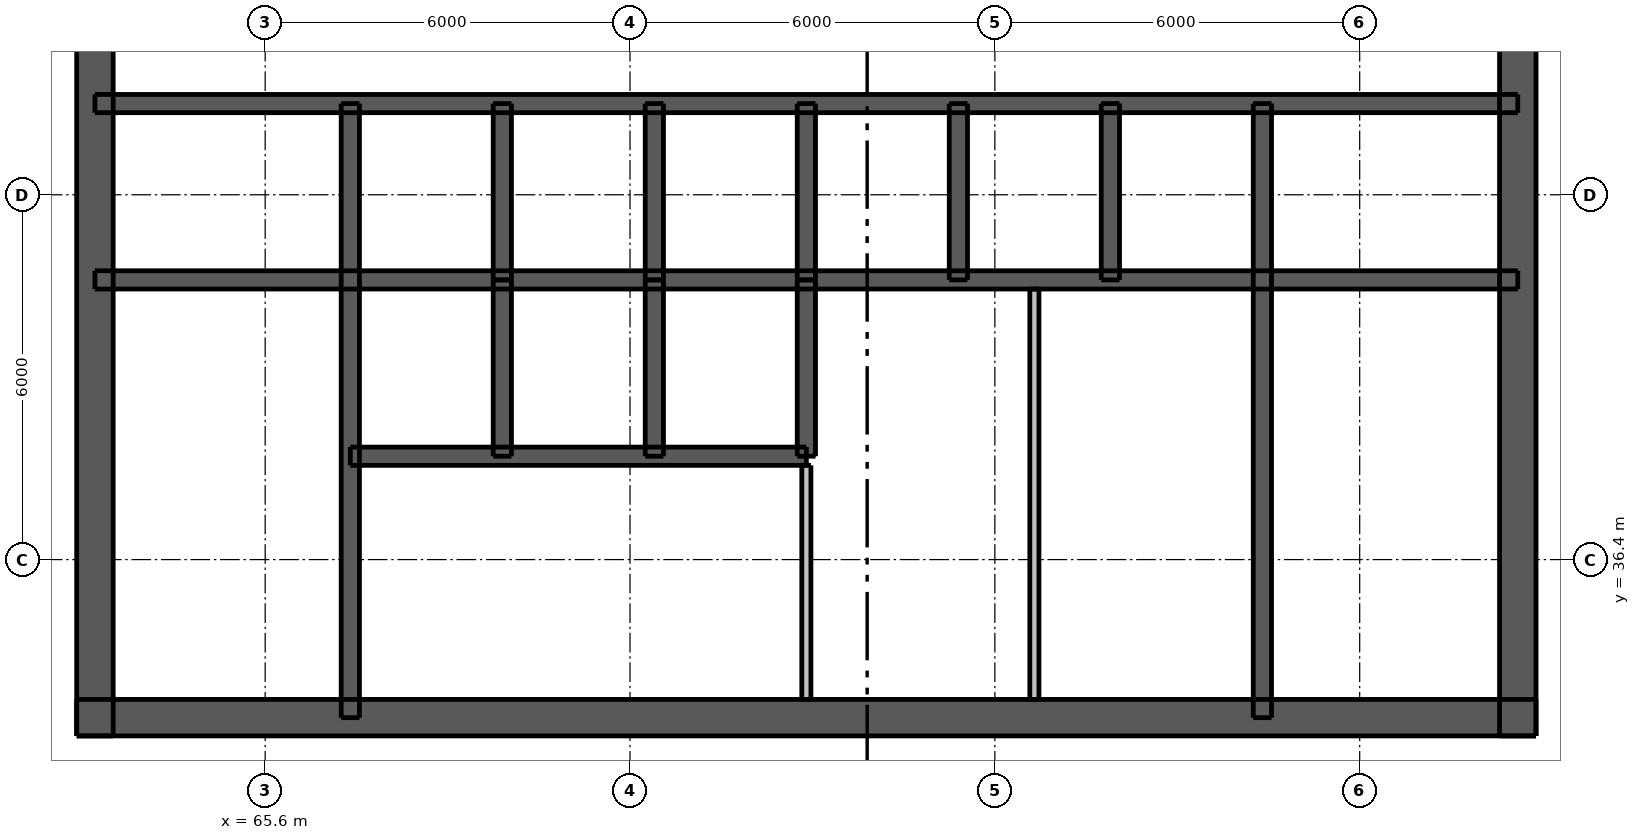
"""IFC4 building model, lengths in metres.
Left out: names, types, materials, properties, quantities, classifications, styles, units other than length and angle.
Written with IfcOpenShell. Run it as: python <this file> out.ifc"""

import sys

from ifc_helpers import new_model, si_unit, direction, frame, frame_2d, origin, place, context, subcontext, project, spatial, rectangle, extrude, element, fill, save


model = new_model("IFC4")
c1 = context("Model", 3, precision=1e-05, world=origin(), true_north=direction((0.0, 1.0)))
c2 = subcontext(c1, "Body", "Model", "MODEL_VIEW")
j1 = project(units=[si_unit("LENGTHUNIT", "METRE"), si_unit("PLANEANGLEUNIT", "RADIAN")], contexts=[c1])
p1 = place(None, origin())
s1 = spatial("IfcSite", under=j1, at=p1, CompositionType="ELEMENT")
p2 = place(p1, origin())
s2 = spatial("IfcBuilding", under=s1, at=p2, CompositionType="ELEMENT")
p3 = place(p2, frame((0.0, 0.0, 226.6)))
s3 = spatial("IfcBuildingStorey", under=s2, at=p3, CompositionType="ELEMENT", Elevation=226.6)
p4 = place(p3, frame((62.5, 33.8, 0.0), z_axis=(0.0, 0.0, 1.0), x_axis=(1.0, 0.0, 0.0)))
e1 = element("IfcWall", 1, at=p4, inside=s3, PredefinedType="SHEAR", context=c2, shape_type="SweptSolid", body=[
    extrude(rectangle(XDim=24.0, YDim=0.6, at=frame_2d((12.0, 0.0))), origin(), (0.0, 0.0, 1.0), 2.95),
])
p5 = place(p4, frame((1.925, 0.0, 0.0)))
e2 = element("IfcOpeningElement", 2, at=p5, cuts=e1, PredefinedType="OPENING", context=c2, shape_type="SweptSolid", body=[
    extrude(rectangle(XDim=1.1, YDim=2.1, at=frame_2d((0.55, 1.05))), frame((0.0, 0.31, 0.0), z_axis=(0.0, -1.0, 0.0), x_axis=(1.0, 0.0, 0.0)), (0.0, 0.0, 1.0), 0.62),
])
p6 = place(p4, frame((20.975, 0.0, 0.0)))
e3 = element("IfcOpeningElement", 3, at=p6, cuts=e1, PredefinedType="OPENING", context=c2, shape_type="SweptSolid", body=[
    extrude(rectangle(XDim=1.1, YDim=2.1, at=frame_2d((0.55, 1.05))), frame((0.0, 0.31, 0.0), z_axis=(0.0, -1.0, 0.0), x_axis=(1.0, 0.0, 0.0)), (0.0, 0.0, 1.0), 0.62),
])
p7 = place(p4, frame((8.0, 0.0, 0.0)))
e4 = element("IfcOpeningElement", 4, at=p7, cuts=e1, PredefinedType="OPENING", context=c2, shape_type="SweptSolid", body=[
    extrude(rectangle(XDim=1.1, YDim=2.1, at=frame_2d((0.55, 1.05))), frame((0.0, 0.31, 0.0), z_axis=(0.0, -1.0, 0.0), x_axis=(1.0, 0.0, 0.0)), (0.0, 0.0, 1.0), 0.62),
])
p8 = place(p4, frame((13.5, 0.0, 0.0)))
e5 = element("IfcOpeningElement", 5, at=p8, cuts=e1, PredefinedType="OPENING", context=c2, shape_type="SweptSolid", body=[
    extrude(rectangle(XDim=0.9, YDim=2.1, at=frame_2d((0.45, 1.05))), frame((0.0, 0.31, 0.0), z_axis=(0.0, -1.0, 0.0), x_axis=(1.0, 0.0, 0.0)), (0.0, 0.0, 1.0), 0.62),
])
p9 = place(p4, frame((17.1, 0.0, 0.0)))
e6 = element("IfcOpeningElement", 6, at=p9, cuts=e1, PredefinedType="OPENING", context=c2, shape_type="SweptSolid", body=[
    extrude(rectangle(XDim=0.9, YDim=2.1, at=frame_2d((0.45, 1.05))), frame((0.0, 0.31, 0.0), z_axis=(0.0, -1.0, 0.0), x_axis=(1.0, 0.0, 0.0)), (0.0, 0.0, 1.0), 0.62),
])
p10 = place(p3, frame((62.8, 33.5, 0.0), z_axis=(0.0, 0.0, 1.0), x_axis=(0.0, 1.0, 0.0)))
e7 = element("IfcWall", 7, at=p10, inside=s3, PredefinedType="SHEAR", context=c2, shape_type="SweptSolid", body=[
    extrude(rectangle(XDim=24.0, YDim=0.6, at=frame_2d((12.0, 0.0))), origin(), (0.0, 0.0, 1.0), 2.95),
])
p11 = place(p10, frame((11.2, 0.0, 0.0)))
e8 = element("IfcOpeningElement", 8, at=p11, cuts=e7, PredefinedType="OPENING", context=c2, shape_type="SweptSolid", body=[
    extrude(rectangle(XDim=1.6, YDim=2.1, at=frame_2d((0.8, 1.05))), frame((0.0, 0.31, 0.0), z_axis=(0.0, -1.0, 0.0), x_axis=(1.0, 0.0, 0.0)), (0.0, 0.0, 1.0), 0.62),
])
p12 = place(p3, frame((86.2, 33.5, 0.0), z_axis=(0.0, 0.0, 1.0), x_axis=(0.0, 1.0, 0.0)))
e9 = element("IfcWall", 9, at=p12, inside=s3, PredefinedType="SHEAR", context=c2, shape_type="SweptSolid", body=[
    extrude(rectangle(XDim=24.0, YDim=0.6, at=frame_2d((12.0, 0.0))), origin(), (0.0, 0.0, 1.0), 2.95),
])
p13 = place(p12, frame((11.2, 0.0, 0.0)))
e10 = element("IfcOpeningElement", 10, at=p13, cuts=e9, PredefinedType="OPENING", context=c2, shape_type="SweptSolid", body=[
    extrude(rectangle(XDim=1.6, YDim=2.1, at=frame_2d((0.8, 1.05))), frame((0.0, 0.31, 0.0), z_axis=(0.0, -1.0, 0.0), x_axis=(1.0, 0.0, 0.0)), (0.0, 0.0, 1.0), 0.62),
])
p14 = place(p3, frame((62.8, 41.0, 0.0), z_axis=(0.0, 0.0, 1.0), x_axis=(1.0, 0.0, 0.0)))
e11 = element("IfcWall", 11, at=p14, inside=s3, PredefinedType="SHEAR", context=c2, shape_type="SweptSolid", body=[
    extrude(rectangle(XDim=23.4, YDim=0.3, at=frame_2d((11.7, 0.0))), origin(), (0.0, 0.0, 1.0), 2.95),
])
p15 = place(p3, frame((62.8, 43.9, 0.0), z_axis=(0.0, 0.0, 1.0), x_axis=(1.0, 0.0, 0.0)))
e12 = element("IfcWall", 12, at=p15, inside=s3, PredefinedType="SHEAR", context=c2, shape_type="SweptSolid", body=[
    extrude(rectangle(XDim=23.4, YDim=0.3, at=frame_2d((11.7, 0.0))), origin(), (0.0, 0.0, 1.0), 2.95),
])
p16 = place(p15, frame((1.725, 0.0, 0.0)))
e13 = element("IfcOpeningElement", 13, at=p16, cuts=e12, PredefinedType="OPENING", context=c2, shape_type="SweptSolid", body=[
    extrude(rectangle(XDim=0.9, YDim=2.1, at=frame_2d((0.45, 1.05))), frame((0.0, 0.16, 0.0), z_axis=(0.0, -1.0, 0.0), x_axis=(1.0, 0.0, 0.0)), (0.0, 0.0, 1.0), 0.32),
])
p17 = place(p15, frame((20.775, 0.0, 0.0)))
e14 = element("IfcOpeningElement", 14, at=p17, cuts=e12, PredefinedType="OPENING", context=c2, shape_type="SweptSolid", body=[
    extrude(rectangle(XDim=0.9, YDim=2.1, at=frame_2d((0.45, 1.05))), frame((0.0, 0.16, 0.0), z_axis=(0.0, -1.0, 0.0), x_axis=(1.0, 0.0, 0.0)), (0.0, 0.0, 1.0), 0.32),
])
p18 = place(p15, frame((5.0, 0.0, 0.0)))
e15 = element("IfcOpeningElement", 15, at=p18, cuts=e12, PredefinedType="OPENING", context=c2, shape_type="SweptSolid", body=[
    extrude(rectangle(XDim=0.9, YDim=2.1, at=frame_2d((0.45, 1.05))), frame((0.0, 0.16, 0.0), z_axis=(0.0, -1.0, 0.0), x_axis=(1.0, 0.0, 0.0)), (0.0, 0.0, 1.0), 0.32),
])
p19 = place(p15, frame((7.5, 0.0, 0.0)))
e16 = element("IfcOpeningElement", 16, at=p19, cuts=e12, PredefinedType="OPENING", context=c2, shape_type="SweptSolid", body=[
    extrude(rectangle(XDim=0.9, YDim=2.1, at=frame_2d((0.45, 1.05))), frame((0.0, 0.16, 0.0), z_axis=(0.0, -1.0, 0.0), x_axis=(1.0, 0.0, 0.0)), (0.0, 0.0, 1.0), 0.32),
])
p20 = place(p15, frame((12.5, 0.0, 0.0)))
e17 = element("IfcOpeningElement", 17, at=p20, cuts=e12, PredefinedType="OPENING", context=c2, shape_type="SweptSolid", body=[
    extrude(rectangle(XDim=0.9, YDim=2.1, at=frame_2d((0.45, 1.05))), frame((0.0, 0.16, 0.0), z_axis=(0.0, -1.0, 0.0), x_axis=(1.0, 0.0, 0.0)), (0.0, 0.0, 1.0), 0.32),
])
p21 = place(p15, frame((15.0, 0.0, 0.0)))
e18 = element("IfcOpeningElement", 18, at=p21, cuts=e12, PredefinedType="OPENING", context=c2, shape_type="SweptSolid", body=[
    extrude(rectangle(XDim=0.9, YDim=2.1, at=frame_2d((0.45, 1.05))), frame((0.0, 0.16, 0.0), z_axis=(0.0, -1.0, 0.0), x_axis=(1.0, 0.0, 0.0)), (0.0, 0.0, 1.0), 0.32),
])
p22 = place(p3, frame((67.0, 33.8, 0.0), z_axis=(0.0, 0.0, 1.0), x_axis=(0.0, 1.0, 0.0)))
e19 = element("IfcWall", 19, at=p22, inside=s3, PredefinedType="SHEAR", context=c2, shape_type="SweptSolid", body=[
    extrude(rectangle(XDim=10.1, YDim=0.3, at=frame_2d((5.05, 0.0))), origin(), (0.0, 0.0, 1.0), 2.95),
])
p23 = place(p22, frame((0.5, 0.0, 0.0)))
e20 = element("IfcOpeningElement", 20, at=p23, cuts=e19, PredefinedType="OPENING", context=c2, shape_type="SweptSolid", body=[
    extrude(rectangle(XDim=1.1, YDim=2.1, at=frame_2d((0.55, 1.05))), frame((0.0, 0.16, 0.0), z_axis=(0.0, -1.0, 0.0), x_axis=(1.0, 0.0, 0.0)), (0.0, 0.0, 1.0), 0.32),
])
p24 = place(p3, frame((82.0, 33.8, 0.0), z_axis=(0.0, 0.0, 1.0), x_axis=(0.0, 1.0, 0.0)))
e21 = element("IfcWall", 21, at=p24, inside=s3, PredefinedType="SHEAR", context=c2, shape_type="SweptSolid", body=[
    extrude(rectangle(XDim=10.1, YDim=0.3, at=frame_2d((5.05, 0.0))), origin(), (0.0, 0.0, 1.0), 2.95),
])
for number, where, z_axis, x_axis in (
    (22, (69.5, 41.0, 0.0), (0.0, 0.0, 1.0), (0.0, 1.0, 0.0)),
    (23, (72.0, 41.0, 0.0), (0.0, 0.0, 1.0), (0.0, 1.0, 0.0)),
    (24, (74.5, 41.0, 0.0), (0.0, 0.0, 1.0), (0.0, 1.0, 0.0)),
    (25, (77.0, 41.0, 0.0), (0.0, 0.0, 1.0), (0.0, 1.0, 0.0)),
    (26, (79.5, 41.0, 0.0), (0.0, 0.0, 1.0), (0.0, 1.0, 0.0)),
):
    element("IfcWall", number, at=place(p3, frame(where, z_axis=z_axis, x_axis=x_axis)), inside=s3, PredefinedType="SHEAR", context=c2, shape_type="SweptSolid", body=[
        extrude(rectangle(XDim=2.9, YDim=0.3, at=frame_2d((1.45, 0.0))), origin(), (0.0, 0.0, 1.0), 2.95),
    ])
p25 = place(p3, frame((67.0, 38.1, 0.0), z_axis=(0.0, 0.0, 1.0), x_axis=(1.0, 0.0, 0.0)))
e27 = element("IfcWall", 27, at=p25, inside=s3, PredefinedType="SHEAR", context=c2, shape_type="SweptSolid", body=[
    extrude(rectangle(XDim=7.5, YDim=0.3, at=frame_2d((3.75, 0.0))), origin(), (0.0, 0.0, 1.0), 2.95),
])
p26 = place(p25, frame((0.7, 0.0, 0.0)))
e28 = element("IfcOpeningElement", 28, at=p26, cuts=e27, PredefinedType="OPENING", context=c2, shape_type="SweptSolid", body=[
    extrude(rectangle(XDim=1.1, YDim=2.1, at=frame_2d((0.55, 1.05))), frame((0.0, 0.16, 0.0), z_axis=(0.0, -1.0, 0.0), x_axis=(1.0, 0.0, 0.0)), (0.0, 0.0, 1.0), 0.32),
])
p27 = place(p25, frame((3.2, 0.0, 0.0)))
e29 = element("IfcOpeningElement", 29, at=p27, cuts=e27, PredefinedType="OPENING", context=c2, shape_type="SweptSolid", body=[
    extrude(rectangle(XDim=1.1, YDim=2.1, at=frame_2d((0.55, 1.05))), frame((0.0, 0.16, 0.0), z_axis=(0.0, -1.0, 0.0), x_axis=(1.0, 0.0, 0.0)), (0.0, 0.0, 1.0), 0.32),
])
p28 = place(p25, frame((5.65, 0.0, 0.0)))
e30 = element("IfcOpeningElement", 30, at=p28, cuts=e27, PredefinedType="OPENING", context=c2, shape_type="SweptSolid", body=[
    extrude(rectangle(XDim=1.2, YDim=2.1, at=frame_2d((0.6, 1.05))), frame((0.0, 0.16, 0.0), z_axis=(0.0, -1.0, 0.0), x_axis=(1.0, 0.0, 0.0)), (0.0, 0.0, 1.0), 0.32),
])
for number, where, z_axis, x_axis in (
    (31, (69.5, 38.1, 0.0), (0.0, 0.0, 1.0), (0.0, 1.0, 0.0)),
    (32, (72.0, 38.1, 0.0), (0.0, 0.0, 1.0), (0.0, 1.0, 0.0)),
    (33, (74.5, 38.1, 0.0), (0.0, 0.0, 1.0), (0.0, 1.0, 0.0)),
):
    element("IfcWall", number, at=place(p3, frame(where, z_axis=z_axis, x_axis=x_axis)), inside=s3, PredefinedType="SHEAR", context=c2, shape_type="SweptSolid", body=[
        extrude(rectangle(XDim=2.9, YDim=0.3, at=frame_2d((1.45, 0.0))), origin(), (0.0, 0.0, 1.0), 2.95),
    ])
p29 = place(p3, frame((74.5, 34.1, 0.0), z_axis=(0.0, 0.0, 1.0), x_axis=(0.0, 1.0, 0.0)))
e34 = element("IfcWall", 34, at=p29, inside=s3, PredefinedType="PLUMBINGWALL", context=c2, shape_type="SweptSolid", body=[
    extrude(rectangle(XDim=3.85, YDim=0.15, at=frame_2d((1.925, 0.0))), origin(), (0.0, 0.0, 1.0), 2.95),
])
p30 = place(p3, frame((78.25, 34.1, 0.0), z_axis=(0.0, 0.0, 1.0), x_axis=(0.0, 1.0, 0.0)))
e35 = element("IfcWall", 35, at=p30, inside=s3, PredefinedType="PLUMBINGWALL", context=c2, shape_type="SweptSolid", body=[
    extrude(rectangle(XDim=6.75, YDim=0.15, at=frame_2d((3.375, 0.0))), origin(), (0.0, 0.0, 1.0), 2.95),
])
p31 = place(p5, origin())
e36 = element("IfcDoor", 36, at=p31, inside=s3, OperationType="SINGLE_SWING_LEFT", PredefinedType="DOOR", context=c2, shape_type="SweptSolid", body=[
    extrude(rectangle(XDim=1.1, YDim=2.1, at=frame_2d((0.55, 1.05))), frame((0.0, 0.288, 0.0), z_axis=(0.0, -1.0, 0.0), x_axis=(1.0, 0.0, 0.0)), (0.0, 0.0, 1.0), 0.05),
])
fill(e2, e36)
p32 = place(p6, origin())
e37 = element("IfcDoor", 37, at=p32, inside=s3, OperationType="SINGLE_SWING_RIGHT", PredefinedType="DOOR", context=c2, shape_type="SweptSolid", body=[
    extrude(rectangle(XDim=1.1, YDim=2.1, at=frame_2d((0.55, 1.05))), frame((0.0, 0.288, 0.0), z_axis=(0.0, -1.0, 0.0), x_axis=(1.0, 0.0, 0.0)), (0.0, 0.0, 1.0), 0.05),
])
fill(e3, e37)
p33 = place(p11, origin())
e38 = element("IfcDoor", 38, at=p33, inside=s3, OperationType="DOUBLE_DOOR_SINGLE_SWING", PredefinedType="DOOR", context=c2, shape_type="SweptSolid", body=[
    extrude(rectangle(XDim=1.6, YDim=2.1, at=frame_2d((0.8, 1.05))), frame((0.0, -0.237, 0.0), z_axis=(0.0, -1.0, 0.0), x_axis=(1.0, 0.0, 0.0)), (0.0, 0.0, 1.0), 0.05),
])
fill(e8, e38)
p34 = place(p13, origin())
e39 = element("IfcDoor", 39, at=p34, inside=s3, OperationType="DOUBLE_DOOR_SINGLE_SWING", PredefinedType="DOOR", context=c2, shape_type="SweptSolid", body=[
    extrude(rectangle(XDim=1.6, YDim=2.1, at=frame_2d((0.8, 1.05))), frame((0.0, 0.288, 0.0), z_axis=(0.0, -1.0, 0.0), x_axis=(1.0, 0.0, 0.0)), (0.0, 0.0, 1.0), 0.05),
])
fill(e10, e39)
p35 = place(p7, origin())
e40 = element("IfcDoor", 40, at=p35, inside=s3, OperationType="SINGLE_SWING_LEFT", PredefinedType="DOOR", context=c2, shape_type="SweptSolid", body=[
    extrude(rectangle(XDim=1.1, YDim=2.1, at=frame_2d((0.55, 1.05))), frame((0.0, 0.288, 0.0), z_axis=(0.0, -1.0, 0.0), x_axis=(1.0, 0.0, 0.0)), (0.0, 0.0, 1.0), 0.05),
])
fill(e4, e40)
p36 = place(p23, origin())
e41 = element("IfcDoor", 41, at=p36, inside=s3, OperationType="SINGLE_SWING_RIGHT", PredefinedType="DOOR", context=c2, shape_type="SweptSolid", body=[
    extrude(rectangle(XDim=1.1, YDim=2.1, at=frame_2d((0.55, 1.05))), frame((0.0, -0.087, 0.0), z_axis=(0.0, -1.0, 0.0), x_axis=(1.0, 0.0, 0.0)), (0.0, 0.0, 1.0), 0.05),
])
fill(e20, e41)
p37 = place(p8, origin())
e42 = element("IfcDoor", 42, at=p37, inside=s3, OperationType="SINGLE_SWING_LEFT", PredefinedType="DOOR", context=c2, shape_type="SweptSolid", body=[
    extrude(rectangle(XDim=0.9, YDim=2.1, at=frame_2d((0.45, 1.05))), frame((0.0, 0.288, 0.0), z_axis=(0.0, -1.0, 0.0), x_axis=(1.0, 0.0, 0.0)), (0.0, 0.0, 1.0), 0.05),
])
fill(e5, e42)
p38 = place(p9, origin())
e43 = element("IfcDoor", 43, at=p38, inside=s3, OperationType="SINGLE_SWING_LEFT", PredefinedType="DOOR", context=c2, shape_type="SweptSolid", body=[
    extrude(rectangle(XDim=0.9, YDim=2.1, at=frame_2d((0.45, 1.05))), frame((0.0, 0.288, 0.0), z_axis=(0.0, -1.0, 0.0), x_axis=(1.0, 0.0, 0.0)), (0.0, 0.0, 1.0), 0.05),
])
fill(e6, e43)
p39 = place(p16, origin())
e44 = element("IfcDoor", 44, at=p39, inside=s3, OperationType="SINGLE_SWING_LEFT", PredefinedType="DOOR", context=c2, shape_type="SweptSolid", body=[
    extrude(rectangle(XDim=0.9, YDim=2.1, at=frame_2d((0.45, 1.05))), frame((0.0, -0.087, 0.0), z_axis=(0.0, -1.0, 0.0), x_axis=(1.0, 0.0, 0.0)), (0.0, 0.0, 1.0), 0.05),
])
fill(e13, e44)
p40 = place(p17, origin())
e45 = element("IfcDoor", 45, at=p40, inside=s3, OperationType="SINGLE_SWING_LEFT", PredefinedType="DOOR", context=c2, shape_type="SweptSolid", body=[
    extrude(rectangle(XDim=0.9, YDim=2.1, at=frame_2d((0.45, 1.05))), frame((0.0, -0.087, 0.0), z_axis=(0.0, -1.0, 0.0), x_axis=(1.0, 0.0, 0.0)), (0.0, 0.0, 1.0), 0.05),
])
fill(e14, e45)
p41 = place(p18, origin())
e46 = element("IfcDoor", 46, at=p41, inside=s3, OperationType="SINGLE_SWING_RIGHT", PredefinedType="DOOR", context=c2, shape_type="SweptSolid", body=[
    extrude(rectangle(XDim=0.9, YDim=2.1, at=frame_2d((0.45, 1.05))), frame((0.0, -0.087, 0.0), z_axis=(0.0, -1.0, 0.0), x_axis=(1.0, 0.0, 0.0)), (0.0, 0.0, 1.0), 0.05),
])
fill(e15, e46)
p42 = place(p19, origin())
e47 = element("IfcDoor", 47, at=p42, inside=s3, OperationType="SINGLE_SWING_LEFT", PredefinedType="DOOR", context=c2, shape_type="SweptSolid", body=[
    extrude(rectangle(XDim=0.9, YDim=2.1, at=frame_2d((0.45, 1.05))), frame((0.0, -0.087, 0.0), z_axis=(0.0, -1.0, 0.0), x_axis=(1.0, 0.0, 0.0)), (0.0, 0.0, 1.0), 0.05),
])
fill(e16, e47)
p43 = place(p20, origin())
e48 = element("IfcDoor", 48, at=p43, inside=s3, OperationType="SINGLE_SWING_LEFT", PredefinedType="DOOR", context=c2, shape_type="SweptSolid", body=[
    extrude(rectangle(XDim=0.9, YDim=2.1, at=frame_2d((0.45, 1.05))), frame((0.0, -0.087, 0.0), z_axis=(0.0, -1.0, 0.0), x_axis=(1.0, 0.0, 0.0)), (0.0, 0.0, 1.0), 0.05),
])
fill(e17, e48)
p44 = place(p21, origin())
e49 = element("IfcDoor", 49, at=p44, inside=s3, OperationType="SINGLE_SWING_RIGHT", PredefinedType="DOOR", context=c2, shape_type="SweptSolid", body=[
    extrude(rectangle(XDim=0.9, YDim=2.1, at=frame_2d((0.45, 1.05))), frame((0.0, -0.087, 0.0), z_axis=(0.0, -1.0, 0.0), x_axis=(1.0, 0.0, 0.0)), (0.0, 0.0, 1.0), 0.05),
])
fill(e18, e49)
p45 = place(p26, origin())
e50 = element("IfcDoor", 50, at=p45, inside=s3, OperationType="DOUBLE_DOOR_SLIDING", PredefinedType="DOOR", context=c2, shape_type="SweptSolid", body=[
    extrude(rectangle(XDim=1.1, YDim=2.1, at=frame_2d((0.55, 1.05))), frame((0.0, 0.025, 0.0), z_axis=(0.0, -1.0, 0.0), x_axis=(1.0, 0.0, 0.0)), (0.0, 0.0, 1.0), 0.05),
])
fill(e28, e50)
p46 = place(p27, origin())
e51 = element("IfcDoor", 51, at=p46, inside=s3, OperationType="DOUBLE_DOOR_SLIDING", PredefinedType="DOOR", context=c2, shape_type="SweptSolid", body=[
    extrude(rectangle(XDim=1.1, YDim=2.1, at=frame_2d((0.55, 1.05))), frame((0.0, 0.025, 0.0), z_axis=(0.0, -1.0, 0.0), x_axis=(1.0, 0.0, 0.0)), (0.0, 0.0, 1.0), 0.05),
])
fill(e29, e51)
p47 = place(p28, origin())
e52 = element("IfcDoor", 52, at=p47, inside=s3, OperationType="DOUBLE_DOOR_SLIDING", PredefinedType="DOOR", context=c2, shape_type="SweptSolid", body=[
    extrude(rectangle(XDim=1.2, YDim=2.1, at=frame_2d((0.6, 1.05))), frame((0.0, 0.025, 0.0), z_axis=(0.0, -1.0, 0.0), x_axis=(1.0, 0.0, 0.0)), (0.0, 0.0, 1.0), 0.05),
])
fill(e30, e52)
save(model, sys.argv[1])
